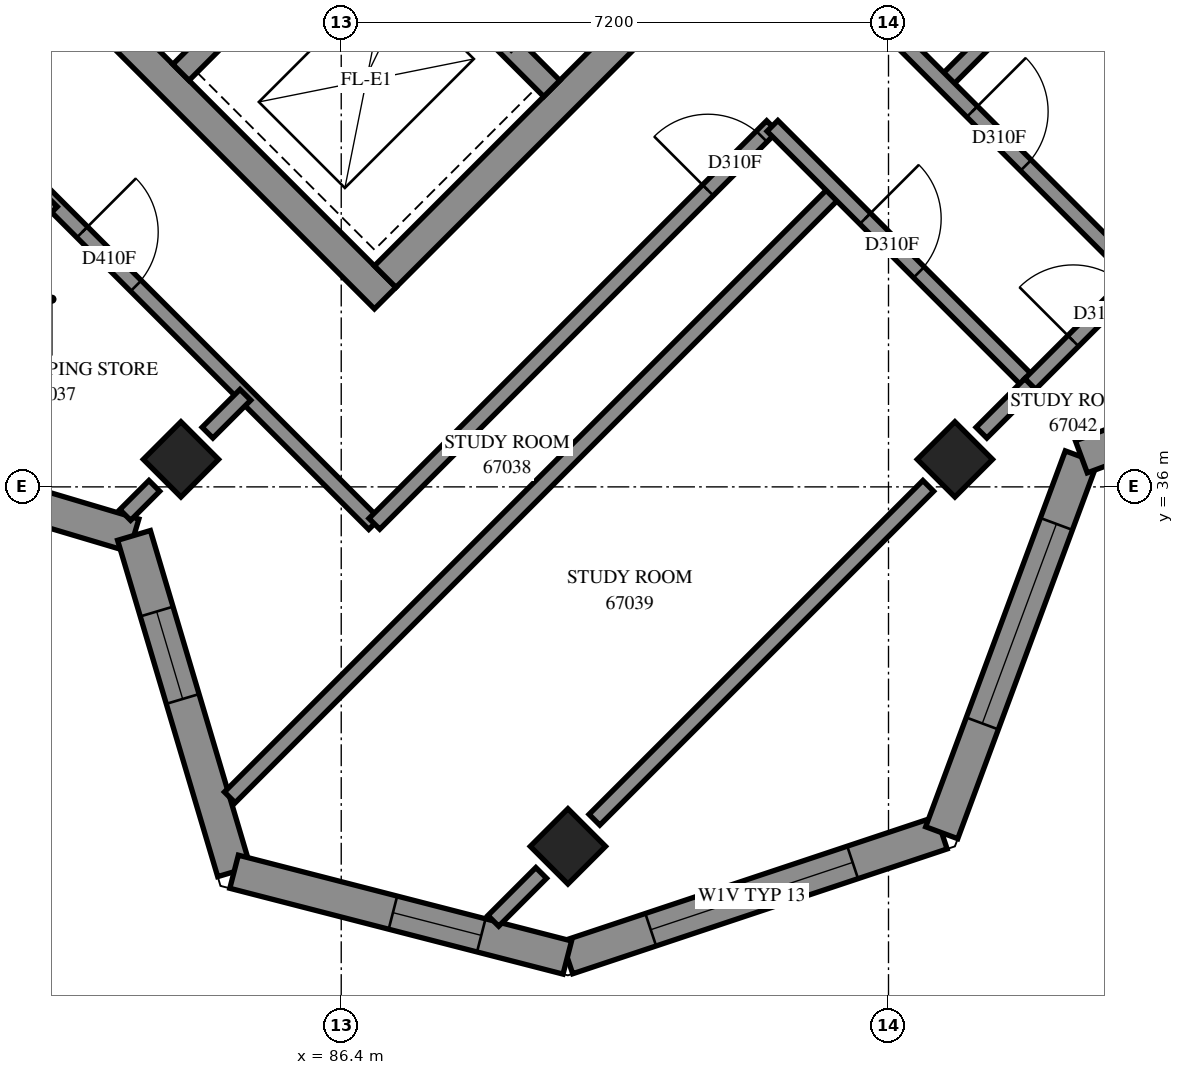
"""IFC4 building model, lengths in metres.
Left out: names, types, materials, properties, quantities, classifications, styles, units other than length and angle.
Written with IfcOpenShell. Run it as: python <this file> out.ifc"""

import sys

from ifc_helpers import new_model, si_unit, direction, frame, frame_2d, origin, origin_2d, place, context, subcontext, project, spatial, polyline, rectangle, outline, extrude, element, fill, save


model = new_model("IFC4")
c1 = context("Model", 3, precision=1e-05, world=origin(), true_north=direction((0.0, 1.0)))
c2 = subcontext(c1, "Body", "Model", "MODEL_VIEW")
j1 = project(units=[si_unit("LENGTHUNIT", "METRE"), si_unit("PLANEANGLEUNIT", "RADIAN")], contexts=[c1])
p1 = place(None, origin())
s1 = spatial("IfcSite", under=j1, at=p1, CompositionType="ELEMENT")
p2 = place(p1, origin())
s2 = spatial("IfcBuilding", under=s1, at=p2, CompositionType="ELEMENT")
p3 = place(p2, frame((0.0, 0.0, 247.2)))
s3 = spatial("IfcBuildingStorey", under=s2, at=p3, CompositionType="ELEMENT", Elevation=247.2)
for number, where, z_axis, x_axis in (
    (1, (84.291, 36.362, 0.0), (0.0, 0.0, 1.0), (0.707, -0.707, 0.0)),
    (2, (94.474, 36.362, 0.0), (0.0, 0.0, 1.0), (0.707, -0.707, 0.0)),
    (3, (89.382, 31.271, 0.0), (0.0, 0.0, 1.0), (0.707, -0.707, 0.0)),
):
    element("IfcColumn", number, at=place(p3, frame(where, z_axis=z_axis, x_axis=x_axis)), inside=s3, PredefinedType="COLUMN", context=c2, shape_type="SweptSolid", body=[
        extrude(rectangle(XDim=0.7, YDim=0.7, at=origin_2d()), origin(), (0.0, 0.0, 1.0), 3.1),
    ])
p4 = place(p3, frame((76.23, 49.231, -0.3), z_axis=(0.0, 0.0, 1.0), x_axis=(0.7071034917, -0.7071100706, 0.0)))
e4 = element("IfcWall", 4, at=p4, inside=s3, PredefinedType="SHEAR", context=c2, shape_type="SweptSolid", body=[
    extrude(rectangle(XDim=15.2, YDim=0.4, at=frame_2d((7.6, 0.0))), origin(), (0.0, 0.0, 1.0), 2.7),
])
p5 = place(p3, frame((86.978, 38.766, -0.3), z_axis=(0.0, 0.0, 1.0), x_axis=(0.7071067812, 0.7071067812, 0.0)))
e5 = element("IfcWall", 5, at=p5, inside=s3, PredefinedType="SHEAR", context=c2, shape_type="SweptSolid", body=[
    extrude(rectangle(XDim=14.4, YDim=0.4, at=frame_2d((7.2, 0.0))), origin(), (0.0, 0.0, 1.0), 2.7),
])
p6 = place(p5, frame((4.55, 0.0, 0.3)))
e6 = element("IfcOpeningElement", 6, at=p6, cuts=e5, PredefinedType="OPENING", context=c2, shape_type="SweptSolid", body=[
    extrude(rectangle(XDim=1.1, YDim=2.1, at=frame_2d((0.55, 1.05))), frame((0.0, 0.21, 0.0), z_axis=(0.0, -1.0, 0.0), x_axis=(1.0, 0.0, 0.0)), (0.0, 0.0, 1.0), 0.42),
])
p7 = place(p5, frame((11.35, 0.0, 0.3)))
e7 = element("IfcOpeningElement", 7, at=p7, cuts=e5, PredefinedType="OPENING", context=c2, shape_type="SweptSolid", body=[
    extrude(rectangle(XDim=1.1, YDim=2.1, at=frame_2d((0.55, 1.05))), frame((0.0, 0.21, 0.0), z_axis=(0.0, -1.0, 0.0), x_axis=(1.0, 0.0, 0.0)), (0.0, 0.0, 1.0), 0.42),
])
p8 = place(p3, frame((84.291, 41.453, 0.0), z_axis=(0.0, 0.0, 1.0), x_axis=(0.7071067812, 0.7071067812, 0.0)))
e8 = element("IfcWall", 8, at=p8, inside=s3, PredefinedType="SOLIDWALL", context=c2, shape_type="SweptSolid", body=[
    extrude(rectangle(XDim=3.3, YDim=0.3, at=frame_2d((1.65, 0.0))), origin(), (0.0, 0.0, 1.0), 3.1),
])
p9 = place(p3, frame((78.988, 51.423, 0.0), z_axis=(0.0, 0.0, 1.0), x_axis=(0.7071067812, -0.7071067812, 0.0)))
e9 = element("IfcWall", 9, at=p9, inside=s3, PredefinedType="SOLIDWALL", context=c2, shape_type="SweptSolid", body=[
    extrude(rectangle(XDim=14.4, YDim=0.3, at=frame_2d((7.2, 0.0))), origin(), (0.0, 0.0, 1.0), 3.1),
])
p10 = place(p9, frame((1.35, 0.0, 0.0)))
e10 = element("IfcOpeningElement", 10, at=p10, cuts=e9, PredefinedType="OPENING", context=c2, shape_type="SweptSolid", body=[
    extrude(rectangle(XDim=0.9, YDim=2.1, at=frame_2d((0.45, 1.05))), frame((0.0, 0.16, 0.0), z_axis=(0.0, -1.0, 0.0), x_axis=(1.0, 0.0, 0.0)), (0.0, 0.0, 1.0), 0.32),
])
p11 = place(p9, frame((4.95, 0.0, 0.0)))
e11 = element("IfcOpeningElement", 11, at=p11, cuts=e9, PredefinedType="OPENING", context=c2, shape_type="SweptSolid", body=[
    extrude(rectangle(XDim=0.9, YDim=2.1, at=frame_2d((0.45, 1.05))), frame((0.0, 0.16, 0.0), z_axis=(0.0, -1.0, 0.0), x_axis=(1.0, 0.0, 0.0)), (0.0, 0.0, 1.0), 0.32),
])
p12 = place(p9, frame((8.55, 0.0, 0.0)))
e12 = element("IfcOpeningElement", 12, at=p12, cuts=e9, PredefinedType="OPENING", context=c2, shape_type="SweptSolid", body=[
    extrude(rectangle(XDim=0.9, YDim=2.1, at=frame_2d((0.45, 1.05))), frame((0.0, 0.16, 0.0), z_axis=(0.0, -1.0, 0.0), x_axis=(1.0, 0.0, 0.0)), (0.0, 0.0, 1.0), 0.32),
])
p13 = place(p9, frame((12.05, 0.0, 0.0)))
e13 = element("IfcOpeningElement", 13, at=p13, cuts=e9, PredefinedType="OPENING", context=c2, shape_type="SweptSolid", body=[
    extrude(rectangle(XDim=1.1, YDim=2.1, at=frame_2d((0.55, 1.05))), frame((0.0, 0.16, 0.0), z_axis=(0.0, -1.0, 0.0), x_axis=(1.0, 0.0, 0.0)), (0.0, 0.0, 1.0), 0.32),
])
p14 = place(p3, frame((89.374, 29.808, 0.0), z_axis=(0.0, 0.0, 1.0), x_axis=(0.9486832981, 0.316227766, 0.0)))
e14 = element("IfcWall", 14, at=p14, inside=s3, PredefinedType="SOLIDWALL", context=c2, shape_type="SweptSolid", body=[
    extrude(outline(polyline([(-0.066, -0.225), (5.3, -0.225), (5.085, 0.225), (0.066, 0.225), (-0.066, -0.225)])), origin(), (0.0, 0.0, 1.0), 3.1),
])
p15 = place(p14, frame((1.157, 0.0, 0.45)))
e15 = element("IfcOpeningElement", 15, at=p15, cuts=e14, PredefinedType="OPENING", context=c2, shape_type="SweptSolid", body=[
    extrude(rectangle(XDim=2.8, YDim=2.55, at=frame_2d((1.4, 1.275))), frame((0.0, 0.235, 0.0), z_axis=(0.0, -1.0, 0.0), x_axis=(1.0, 0.0, 0.0)), (0.0, 0.0, 1.0), 0.47),
])
p16 = place(p3, frame((94.3, 31.45, 0.0), z_axis=(0.0, 0.0, 1.0), x_axis=(0.3481927166, 0.9374229739, 0.0)))
e16 = element("IfcWall", 16, at=p16, inside=s3, PredefinedType="SOLIDWALL", context=c2, shape_type="SweptSolid", body=[
    extrude(outline(polyline([(-0.108, -0.225), (5.172, -0.225), (5.379, 0.225), (0.108, 0.225), (-0.108, -0.225)])), origin(), (0.0, 0.0, 1.0), 3.1),
])
p17 = place(p16, frame((1.534, 0.0, 0.45)))
e17 = element("IfcOpeningElement", 17, at=p17, cuts=e16, PredefinedType="OPENING", context=c2, shape_type="SweptSolid", body=[
    extrude(rectangle(XDim=2.8, YDim=2.55, at=frame_2d((1.4, 1.275))), frame((0.0, 0.235, 0.0), z_axis=(0.0, -1.0, 0.0), x_axis=(1.0, 0.0, 0.0)), (0.0, 0.0, 1.0), 0.47),
])
p18 = place(p3, frame((96.137, 36.395, 0.0), z_axis=(0.0, 0.0, 1.0), x_axis=(0.937429161, 0.3481760591, 0.0)))
e18 = element("IfcWall", 18, at=p18, inside=s3, PredefinedType="SOLIDWALL", context=c2, shape_type="SweptSolid", body=[
    extrude(outline(polyline([(0.103, -0.225), (5.383, -0.225), (5.168, 0.225), (-0.103, 0.225), (0.103, -0.225)])), origin(), (0.0, 0.0, 1.0), 3.1),
])
p19 = place(p18, frame((1.651, 0.0, 0.45)))
e19 = element("IfcOpeningElement", 19, at=p19, cuts=e18, PredefinedType="OPENING", context=c2, shape_type="SweptSolid", body=[
    extrude(rectangle(XDim=2.8, YDim=2.55, at=frame_2d((1.4, 1.275))), frame((0.0, 0.235, 0.0), z_axis=(0.0, -1.0, 0.0), x_axis=(1.0, 0.0, 0.0)), (0.0, 0.0, 1.0), 0.47),
])
p20 = place(p3, frame((79.249, 36.678, 0.0), z_axis=(0.0, 0.0, 1.0), x_axis=(0.9584470724, -0.2852704146, 0.0)))
e20 = element("IfcWall", 20, at=p20, inside=s3, PredefinedType="SOLIDWALL", context=c2, shape_type="SweptSolid", body=[
    extrude(outline(polyline([(-0.127, -0.225), (4.495, -0.225), (4.738, 0.225), (0.127, 0.225), (-0.127, -0.225)])), origin(), (0.0, 0.0, 1.0), 3.1),
])
p21 = place(p20, frame((0.616, 0.0, 0.45)))
e21 = element("IfcOpeningElement", 21, at=p21, cuts=e20, PredefinedType="OPENING", context=c2, shape_type="SweptSolid", body=[
    extrude(rectangle(XDim=2.8, YDim=2.55, at=frame_2d((1.4, 1.275))), frame((0.0, 0.235, 0.0), z_axis=(0.0, -1.0, 0.0), x_axis=(1.0, 0.0, 0.0)), (0.0, 0.0, 1.0), 0.47),
])
p22 = place(p3, frame((83.674, 35.361, 0.0), z_axis=(0.0, 0.0, 1.0), x_axis=(0.2852704146, -0.9584470724, 0.0)))
e22 = element("IfcWall", 22, at=p22, inside=s3, PredefinedType="SOLIDWALL", context=c2, shape_type="SweptSolid", body=[
    extrude(outline(polyline([(0.122, -0.225), (4.744, -0.225), (4.489, 0.225), (-0.122, 0.225), (0.122, -0.225)])), origin(), (0.0, 0.0, 1.0), 3.1),
])
p23 = place(p22, frame((1.045, 0.0, 0.45)))
e23 = element("IfcOpeningElement", 23, at=p23, cuts=e22, PredefinedType="OPENING", context=c2, shape_type="SweptSolid", body=[
    extrude(rectangle(XDim=1.2, YDim=2.55, at=frame_2d((0.6, 1.275))), frame((0.0, 0.235, 0.0), z_axis=(0.0, -1.0, 0.0), x_axis=(1.0, 0.0, 0.0)), (0.0, 0.0, 1.0), 0.47),
])
p24 = place(p3, frame((84.99, 30.937, 0.0), z_axis=(0.0, 0.0, 1.0), x_axis=(0.9684082316, -0.2493702007, 0.0)))
e24 = element("IfcWall", 24, at=p24, inside=s3, PredefinedType="SOLIDWALL", context=c2, shape_type="SweptSolid", body=[
    extrude(outline(polyline([(-0.127, -0.225), (4.593, -0.225), (4.46, 0.225), (0.127, 0.225), (-0.127, -0.225)])), origin(), (0.0, 0.0, 1.0), 3.1),
])
p25 = place(p24, frame((2.158, 0.0, 0.45)))
e25 = element("IfcOpeningElement", 25, at=p25, cuts=e24, PredefinedType="OPENING", context=c2, shape_type="SweptSolid", body=[
    extrude(rectangle(XDim=1.2, YDim=2.55, at=frame_2d((0.6, 1.275))), frame((0.0, 0.235, 0.0), z_axis=(0.0, -1.0, 0.0), x_axis=(1.0, 0.0, 0.0)), (0.0, 0.0, 1.0), 0.47),
])
p26 = place(p3, frame((84.934, 31.915, 0.0), z_axis=(0.0, 0.0, 1.0), x_axis=(0.7071067812, 0.7071067812, 0.0)))
e26 = element("IfcWall", 26, at=p26, inside=s3, PredefinedType="PARTITIONING", context=c2, shape_type="SweptSolid", body=[
    extrude(rectangle(XDim=11.29, YDim=0.2, at=frame_2d((5.645, 0.0))), origin(), (0.0, 0.0, 1.0), 3.1),
])
p27 = place(p3, frame((80.747, 41.597, 0.0), z_axis=(0.0, 0.0, 1.0), x_axis=(0.7071067812, -0.7071067812, 0.0)))
e27 = element("IfcWall", 27, at=p27, inside=s3, PredefinedType="PARTITIONING", context=c2, shape_type="SweptSolid", body=[
    extrude(rectangle(XDim=8.607, YDim=0.2, at=frame_2d((4.303, 0.0))), origin(), (0.0, 0.0, 1.0), 3.1),
])
p28 = place(p27, frame((0.498, 0.0, 0.0)))
e28 = element("IfcOpeningElement", 28, at=p28, cuts=e27, PredefinedType="OPENING", context=c2, shape_type="SweptSolid", body=[
    extrude(rectangle(XDim=1.0, YDim=2.1, at=frame_2d((0.5, 1.05))), frame((0.0, 0.11, 0.0), z_axis=(0.0, -1.0, 0.0), x_axis=(1.0, 0.0, 0.0)), (0.0, 0.0, 1.0), 0.22),
])
p29 = place(p27, frame((3.175, 0.0, 0.0)))
e29 = element("IfcOpeningElement", 29, at=p29, cuts=e27, PredefinedType="OPENING", context=c2, shape_type="SweptSolid", body=[
    extrude(rectangle(XDim=1.0, YDim=2.1, at=frame_2d((0.5, 1.05))), frame((0.0, 0.11, 0.0), z_axis=(0.0, -1.0, 0.0), x_axis=(1.0, 0.0, 0.0)), (0.0, 0.0, 1.0), 0.22),
])
p30 = place(p3, frame((86.836, 35.514, 0.0), z_axis=(0.0, 0.0, 1.0), x_axis=(0.7071067812, 0.7071067812, 0.0)))
e30 = element("IfcWall", 30, at=p30, inside=s3, PredefinedType="PARTITIONING", context=c2, shape_type="SweptSolid", body=[
    extrude(rectangle(XDim=7.399, YDim=0.2, at=frame_2d((3.7, 0.0))), origin(), (0.0, 0.0, 1.0), 3.1),
])
p31 = place(p30, frame((6.207, 0.0, 0.0)))
e31 = element("IfcOpeningElement", 31, at=p31, cuts=e30, PredefinedType="OPENING", context=c2, shape_type="SweptSolid", body=[
    extrude(rectangle(XDim=1.0, YDim=2.1, at=frame_2d((0.5, 1.05))), frame((0.0, 0.11, 0.0), z_axis=(0.0, -1.0, 0.0), x_axis=(1.0, 0.0, 0.0)), (0.0, 0.0, 1.0), 0.22),
])
p32 = place(p3, frame((94.331, 41.313, 0.0), z_axis=(0.0, 0.0, 1.0), x_axis=(0.7071139756, 0.7070995867, 0.0)))
e32 = element("IfcWall", 32, at=p32, inside=s3, PredefinedType="PARTITIONING", context=c2, shape_type="SweptSolid", body=[
    extrude(rectangle(XDim=6.95, YDim=0.2, at=frame_2d((3.475, 0.0))), origin(), (0.0, 0.0, 1.0), 3.1),
])
p33 = place(p3, frame((89.731, 31.621, 0.0), z_axis=(0.0, 0.0, 1.0), x_axis=(0.7071067812, 0.7071067812, 0.0)))
e33 = element("IfcWall", 33, at=p33, inside=s3, PredefinedType="PARTITIONING", context=c2, shape_type="SweptSolid", body=[
    extrude(rectangle(XDim=6.211, YDim=0.2, at=frame_2d((3.106, 0.0))), origin(), (0.0, 0.0, 1.0), 2.6),
])
p34 = place(p3, frame((93.481, 42.157, 0.0), z_axis=(0.0, 0.0, 1.0), x_axis=(0.7071067812, -0.7071067812, 0.0)))
e34 = element("IfcWall", 34, at=p34, inside=s3, PredefinedType="PARTITIONING", context=c2, shape_type="SweptSolid", body=[
    extrude(rectangle(XDim=4.8, YDim=0.2, at=frame_2d((2.4, 0.0))), origin(), (0.0, 0.0, 1.0), 3.1),
])
p35 = place(p34, frame((1.725, 0.0, 0.0)))
e35 = element("IfcOpeningElement", 35, at=p35, cuts=e34, PredefinedType="OPENING", context=c2, shape_type="SweptSolid", body=[
    extrude(rectangle(XDim=1.0, YDim=2.1, at=frame_2d((0.5, 1.05))), frame((0.0, 0.11, 0.0), z_axis=(0.0, -1.0, 0.0), x_axis=(1.0, 0.0, 0.0)), (0.0, 0.0, 1.0), 0.22),
])
p36 = place(p3, frame((92.073, 40.749, 0.0), z_axis=(0.0, 0.0, 1.0), x_axis=(0.7071067812, -0.7071067812, 0.0)))
e36 = element("IfcWall", 36, at=p36, inside=s3, PredefinedType="PARTITIONING", context=c2, shape_type="SweptSolid", body=[
    extrude(rectangle(XDim=4.8, YDim=0.2, at=frame_2d((2.4, 0.0))), origin(), (0.0, 0.0, 1.0), 3.1),
])
p37 = place(p36, frame((1.725, 0.0, 0.0)))
e37 = element("IfcOpeningElement", 37, at=p37, cuts=e36, PredefinedType="OPENING", context=c2, shape_type="SweptSolid", body=[
    extrude(rectangle(XDim=1.0, YDim=2.1, at=frame_2d((0.5, 1.05))), frame((0.0, 0.11, 0.0), z_axis=(0.0, -1.0, 0.0), x_axis=(1.0, 0.0, 0.0)), (0.0, 0.0, 1.0), 0.22),
])
p38 = place(p3, frame((79.635, 36.798, 0.0), z_axis=(0.0, 0.0, 1.0), x_axis=(0.7071187313, 0.7070948309, 0.0)))
e38 = element("IfcWall", 38, at=p38, inside=s3, PredefinedType="PARTITIONING", context=c2, shape_type="SweptSolid", body=[
    extrude(rectangle(XDim=4.184, YDim=0.2, at=frame_2d((2.092, 0.0))), origin(), (0.0, 0.0, 1.0), 3.1),
])
p39 = place(p3, frame((95.463, 37.353, 0.0), z_axis=(0.0, 0.0, 1.0), x_axis=(0.7071067812, 0.7071067812, 0.0)))
e39 = element("IfcWall", 39, at=p39, inside=s3, PredefinedType="PARTITIONING", context=c2, shape_type="SweptSolid", body=[
    extrude(rectangle(XDim=2.0, YDim=0.2, at=frame_2d((1.0, 0.0))), origin(), (0.0, 0.0, 1.0), 2.6),
])
p40 = place(p39, frame((0.802, 0.0, 0.0)))
e40 = element("IfcOpeningElement", 40, at=p40, cuts=e39, PredefinedType="OPENING", context=c2, shape_type="SweptSolid", body=[
    extrude(rectangle(XDim=1.0, YDim=2.1, at=frame_2d((0.5, 1.05))), frame((0.0, 0.11, 0.0), z_axis=(0.0, -1.0, 0.0), x_axis=(1.0, 0.0, 0.0)), (0.0, 0.0, 1.0), 0.22),
])
p41 = place(p3, frame((94.823, 36.713, 0.0), z_axis=(0.0, 0.0, 1.0), x_axis=(0.7071067812, 0.7071067812, 0.0)))
e41 = element("IfcWall", 41, at=p41, inside=s3, PredefinedType="PARTITIONING", context=c2, shape_type="SweptSolid", body=[
    extrude(rectangle(XDim=0.905, YDim=0.2, at=frame_2d((0.453, 0.0))), origin(), (0.0, 0.0, 1.0), 2.6),
])
p42 = place(p3, frame((88.401, 30.291, 0.0), z_axis=(0.0, 0.0, 1.0), x_axis=(0.7071067812, 0.7071067812, 0.0)))
e42 = element("IfcWall", 42, at=p42, inside=s3, PredefinedType="PARTITIONING", context=c2, shape_type="SweptSolid", body=[
    extrude(rectangle(XDim=0.891, YDim=0.2, at=frame_2d((0.446, 0.0))), origin(), (0.0, 0.0, 1.0), 3.1),
])
p43 = place(p3, frame((84.641, 36.713, 0.0), z_axis=(0.0, 0.0, 1.0), x_axis=(0.7071067812, 0.7071067812, 0.0)))
e43 = element("IfcWall", 43, at=p43, inside=s3, PredefinedType="PARTITIONING", context=c2, shape_type="SweptSolid", body=[
    extrude(rectangle(XDim=0.704, YDim=0.2, at=frame_2d((0.352, 0.0))), origin(), (0.0, 0.0, 1.0), 3.1),
])
p44 = place(p3, frame((83.558, 35.63, 0.0), z_axis=(0.0, 0.0, 1.0), x_axis=(0.7070144033, 0.707199147, 0.0)))
e44 = element("IfcWall", 44, at=p44, inside=s3, PredefinedType="PARTITIONING", context=c2, shape_type="SweptSolid", body=[
    extrude(rectangle(XDim=0.541, YDim=0.2, at=frame_2d((0.271, 0.0))), origin(), (0.0, 0.0, 1.0), 3.1),
])
p45 = place(p15, origin())
e45 = element("IfcWindow", 45, at=p45, inside=s3, PartitioningType="SINGLE_PANEL", PredefinedType="WINDOW", context=c2, shape_type="SweptSolid", body=[
    extrude(rectangle(XDim=2.8, YDim=2.55, at=frame_2d((1.4, 1.275))), frame((0.0, 0.205, 0.0), z_axis=(0.0, -1.0, 0.0), x_axis=(1.0, 0.0, 0.0)), (0.0, 0.0, 1.0), 0.06),
])
fill(e15, e45)
p46 = place(p17, origin())
e46 = element("IfcWindow", 46, at=p46, inside=s3, PartitioningType="SINGLE_PANEL", PredefinedType="WINDOW", context=c2, shape_type="SweptSolid", body=[
    extrude(rectangle(XDim=2.8, YDim=2.55, at=frame_2d((1.4, 1.275))), frame((0.0, 0.205, 0.0), z_axis=(0.0, -1.0, 0.0), x_axis=(1.0, 0.0, 0.0)), (0.0, 0.0, 1.0), 0.06),
])
fill(e17, e46)
p47 = place(p23, origin())
e47 = element("IfcWindow", 47, at=p47, inside=s3, PartitioningType="SINGLE_PANEL", PredefinedType="WINDOW", context=c2, shape_type="SweptSolid", body=[
    extrude(rectangle(XDim=1.2, YDim=2.55, at=frame_2d((0.6, 1.275))), frame((0.0, 0.205, 0.0), z_axis=(0.0, -1.0, 0.0), x_axis=(1.0, 0.0, 0.0)), (0.0, 0.0, 1.0), 0.06),
])
fill(e23, e47)
p48 = place(p25, origin())
e48 = element("IfcWindow", 48, at=p48, inside=s3, PartitioningType="SINGLE_PANEL", PredefinedType="WINDOW", context=c2, shape_type="SweptSolid", body=[
    extrude(rectangle(XDim=1.2, YDim=2.55, at=frame_2d((0.6, 1.275))), frame((0.0, 0.205, 0.0), z_axis=(0.0, -1.0, 0.0), x_axis=(1.0, 0.0, 0.0)), (0.0, 0.0, 1.0), 0.06),
])
fill(e25, e48)
p49 = place(p29, origin())
e49 = element("IfcDoor", 49, at=p49, inside=s3, OperationType="SINGLE_SWING_LEFT", PredefinedType="DOOR", context=c2, shape_type="SweptSolid", body=[
    extrude(rectangle(XDim=1.0, YDim=2.1, at=frame_2d((0.5, 1.05))), frame((0.0, 0.025, 0.0), z_axis=(0.0, -1.0, 0.0), x_axis=(1.0, 0.0, 0.0)), (0.0, 0.0, 1.0), 0.05),
])
fill(e29, e49)
p50 = place(p31, origin())
e50 = element("IfcDoor", 50, at=p50, inside=s3, OperationType="SINGLE_SWING_RIGHT", PredefinedType="DOOR", context=c2, shape_type="SweptSolid", body=[
    extrude(rectangle(XDim=1.0, YDim=2.1, at=frame_2d((0.5, 1.05))), frame((0.0, 0.025, 0.0), z_axis=(0.0, -1.0, 0.0), x_axis=(1.0, 0.0, 0.0)), (0.0, 0.0, 1.0), 0.05),
])
fill(e31, e50)
p51 = place(p37, origin())
e51 = element("IfcDoor", 51, at=p51, inside=s3, OperationType="SINGLE_SWING_LEFT", PredefinedType="DOOR", context=c2, shape_type="SweptSolid", body=[
    extrude(rectangle(XDim=1.0, YDim=2.1, at=frame_2d((0.5, 1.05))), frame((0.0, 0.025, 0.0), z_axis=(0.0, -1.0, 0.0), x_axis=(1.0, 0.0, 0.0)), (0.0, 0.0, 1.0), 0.05),
])
fill(e37, e51)
p52 = place(p35, origin())
e52 = element("IfcDoor", 52, at=p52, inside=s3, OperationType="SINGLE_SWING_RIGHT", PredefinedType="DOOR", context=c2, shape_type="SweptSolid", body=[
    extrude(rectangle(XDim=1.0, YDim=2.1, at=frame_2d((0.5, 1.05))), frame((0.0, 0.025, 0.0), z_axis=(0.0, -1.0, 0.0), x_axis=(1.0, 0.0, 0.0)), (0.0, 0.0, 1.0), 0.05),
])
fill(e35, e52)
p53 = place(p40, origin())
e53 = element("IfcDoor", 53, at=p53, inside=s3, OperationType="SINGLE_SWING_RIGHT", PredefinedType="DOOR", context=c2, shape_type="SweptSolid", body=[
    extrude(rectangle(XDim=1.0, YDim=2.1, at=frame_2d((0.5, 1.05))), frame((0.0, 0.025, 0.0), z_axis=(0.0, -1.0, 0.0), x_axis=(1.0, 0.0, 0.0)), (0.0, 0.0, 1.0), 0.05),
])
fill(e40, e53)
save(model, sys.argv[1])
